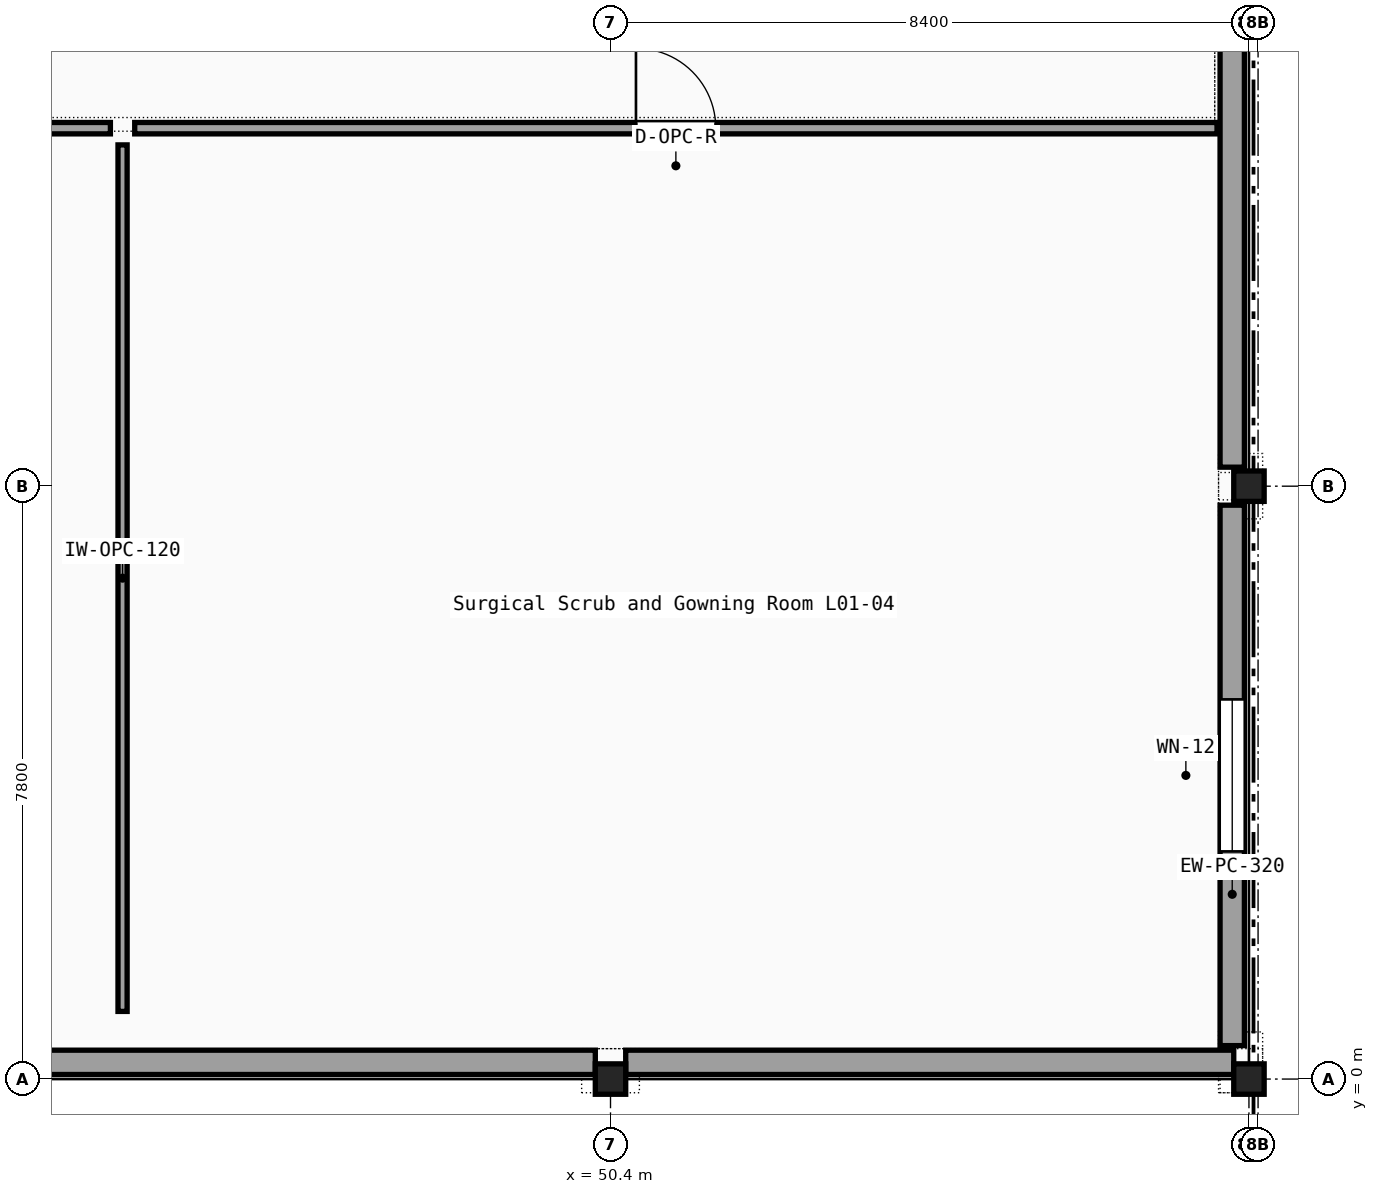
"""IFC4 building model, lengths in metres.
Left out: names, types, materials, properties, quantities, classifications, styles, units other than length and angle.
Written with IfcOpenShell. Run it as: python <this file> out.ifc"""

import sys

from ifc_helpers import new_model, si_unit, direction, frame, frame_2d, origin, origin_2d, place, context, subcontext, project, spatial, rectangle, i_section, extrude, element, fill, save


model = new_model("IFC4")
c1 = context("Model", 3, precision=1e-05, world=origin(), true_north=direction((0.0, 1.0)))
c2 = subcontext(c1, "Body", "Model", "MODEL_VIEW")
j1 = project(units=[si_unit("LENGTHUNIT", "METRE"), si_unit("PLANEANGLEUNIT", "RADIAN")], contexts=[c1])
p1 = place(None, origin())
s1 = spatial("IfcSite", under=j1, at=p1, CompositionType="ELEMENT")
p2 = place(p1, origin())
s2 = spatial("IfcBuilding", under=s1, at=p2, CompositionType="ELEMENT")
p3 = place(p2, frame((0.0, 0.0, 5.1)))
s3 = spatial("IfcBuildingStorey", under=s2, at=p3, CompositionType="ELEMENT", Elevation=5.1)
for number, where, z_axis, x_axis in (
    (1, (50.4, 0.0, 0.0), (0.0, 0.0, 1.0), (1.0, 0.0, 0.0)),
    (2, (58.8, 0.0, 0.0), (0.0, 0.0, 1.0), (1.0, 0.0, 0.0)),
    (3, (58.8, 7.8, 0.0), (0.0, 0.0, 1.0), (1.0, 0.0, 0.0)),
):
    element("IfcColumn", number, at=place(p3, frame(where, z_axis=z_axis, x_axis=x_axis)), inside=s3, PredefinedType="COLUMN", context=c2, shape_type="SweptSolid", body=[
        extrude(i_section(OverallWidth=0.3, OverallDepth=0.4, WebThickness=0.013, FlangeThickness=0.024, FilletRadius=0.027, at=origin_2d()), origin(), (0.0, 0.0, 1.0), 5.1),
    ])
for number, where, z_axis, x_axis in (
    (4, (42.2, 0.22, 0.0), (0.0, 0.0, 1.0), (1.0, 0.0, 0.0)),
    (5, (50.6, 0.22, 0.0), (0.0, 0.0, 1.0), (1.0, 0.0, 0.0)),
):
    element("IfcWall", number, at=place(p3, frame(where, z_axis=z_axis, x_axis=x_axis)), inside=s3, PredefinedType="SOLIDWALL", context=c2, shape_type="SweptSolid", body=[
        extrude(rectangle(XDim=8.0, YDim=0.32, at=frame_2d((4.0, 0.0))), origin(), (0.0, 0.0, 1.0), 4.44),
    ])
p4 = place(p3, frame((58.58, 0.44, 0.0), z_axis=(0.0, 0.0, 1.0), x_axis=(0.0, 1.0, 0.0)))
e6 = element("IfcWall", 6, at=p4, inside=s3, PredefinedType="SOLIDWALL", context=c2, shape_type="SweptSolid", body=[
    extrude(rectangle(XDim=7.11, YDim=0.32, at=frame_2d((3.555, 0.0))), origin(), (0.0, 0.0, 1.0), 4.44),
])
p5 = place(p4, frame((2.555, 0.0, 0.85)))
e7 = element("IfcOpeningElement", 7, at=p5, cuts=e6, PredefinedType="OPENING", context=c2, shape_type="SweptSolid", body=[
    extrude(rectangle(XDim=2.0, YDim=1.65, at=frame_2d((1.0, 0.825))), frame((0.0, 0.17, 0.0), z_axis=(0.0, -1.0, 0.0), x_axis=(1.0, 0.0, 0.0)), (0.0, 0.0, 1.0), 0.34),
])
p6 = place(p3, frame((58.58, 8.05, 0.0), z_axis=(0.0, 0.0, 1.0), x_axis=(0.0, 1.0, 0.0)))
e8 = element("IfcWall", 8, at=p6, inside=s3, PredefinedType="SOLIDWALL", context=c2, shape_type="SweptSolid", body=[
    extrude(rectangle(XDim=7.11, YDim=0.32, at=frame_2d((3.555, 0.0))), origin(), (0.0, 0.0, 1.0), 4.44),
])
p7 = place(p3, frame((29.66, 12.51, 0.0), z_axis=(0.0, 0.0, 1.0), x_axis=(1.0, 0.0, 0.0)))
e9 = element("IfcWall", 9, at=p7, inside=s3, PredefinedType="PARTITIONING", context=c2, shape_type="SweptSolid", body=[
    extrude(rectangle(XDim=14.16, YDim=0.15, at=frame_2d((7.08, 0.0))), origin(), (0.0, 0.0, 1.0), 4.43),
])
p8 = place(p7, frame((6.555, 0.0, 0.0)))
e10 = element("IfcOpeningElement", 10, at=p8, cuts=e9, PredefinedType="OPENING", context=c2, shape_type="SweptSolid", body=[
    extrude(rectangle(XDim=1.05, YDim=2.15, at=frame_2d((0.525, 1.075))), frame((0.0, 0.085, 0.0), z_axis=(0.0, -1.0, 0.0), x_axis=(1.0, 0.0, 0.0)), (0.0, 0.0, 1.0), 0.17),
])
p9 = place(p3, frame((43.98, 0.89, 0.0), z_axis=(0.0, 0.0, 1.0), x_axis=(0.0, 1.0, 0.0)))
e11 = element("IfcWall", 11, at=p9, inside=s3, PredefinedType="PARTITIONING", context=c2, shape_type="SweptSolid", body=[
    extrude(rectangle(XDim=11.4, YDim=0.12, at=frame_2d((5.7, 0.0))), origin(), (0.0, 0.0, 1.0), 4.82),
])
p10 = place(p3, frame((44.14, 12.51, 0.0), z_axis=(0.0, 0.0, 1.0), x_axis=(1.0, 0.0, 0.0)))
e12 = element("IfcWall", 12, at=p10, inside=s3, PredefinedType="PARTITIONING", context=c2, shape_type="SweptSolid", body=[
    extrude(rectangle(XDim=14.24, YDim=0.15, at=frame_2d((7.12, 0.0))), origin(), (0.0, 0.0, 1.0), 4.82),
])
p11 = place(p10, frame((6.595, 0.0, 0.0)))
e13 = element("IfcOpeningElement", 13, at=p11, cuts=e12, PredefinedType="OPENING", context=c2, shape_type="SweptSolid", body=[
    extrude(rectangle(XDim=1.05, YDim=2.15, at=frame_2d((0.525, 1.075))), frame((0.0, 0.085, 0.0), z_axis=(0.0, -1.0, 0.0), x_axis=(1.0, 0.0, 0.0)), (0.0, 0.0, 1.0), 0.17),
])
p12 = place(p5, origin())
e14 = element("IfcWindow", 14, at=p12, inside=s3, PartitioningType="SINGLE_PANEL", PredefinedType="WINDOW", context=c2, shape_type="SweptSolid", body=[
    extrude(rectangle(XDim=2.0, YDim=1.65, at=frame_2d((1.0, 0.825))), frame((0.0, 0.03, 0.0), z_axis=(0.0, -1.0, 0.0), x_axis=(1.0, 0.0, 0.0)), (0.0, 0.0, 1.0), 0.06),
])
fill(e7, e14)
p13 = place(p11, origin())
e15 = element("IfcDoor", 15, at=p13, inside=s3, OperationType="SINGLE_SWING_LEFT", PredefinedType="DOOR", context=c2, shape_type="SweptSolid", body=[
    extrude(rectangle(XDim=1.05, YDim=2.15, at=frame_2d((0.525, 1.075))), frame((0.0, 0.025, 0.0), z_axis=(0.0, -1.0, 0.0), x_axis=(1.0, 0.0, 0.0)), (0.0, 0.0, 1.0), 0.05),
])
fill(e13, e15)
save(model, sys.argv[1])
